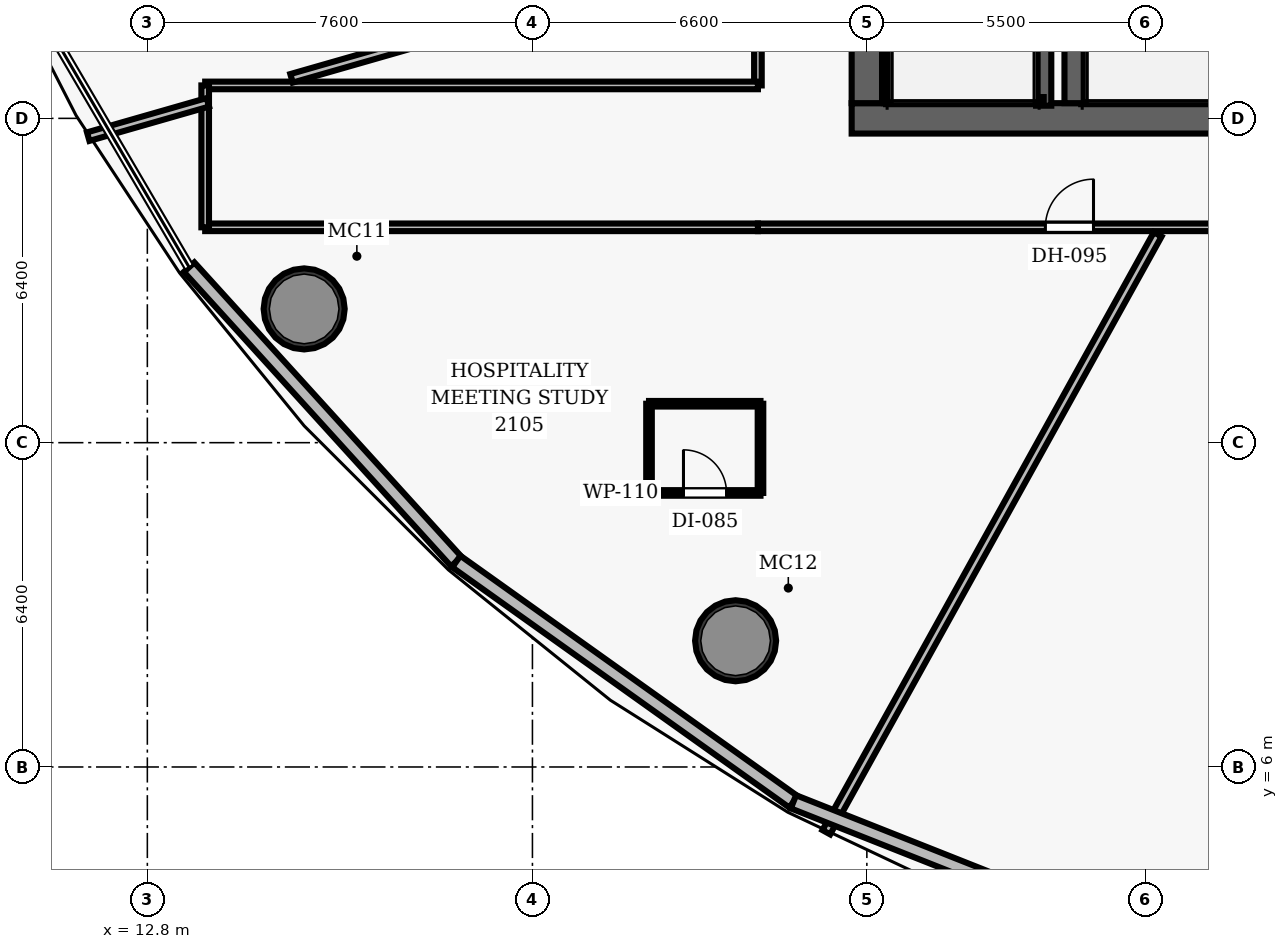
"""IFC4 building model, lengths in metres.
Left out: names, types, materials, properties, quantities, classifications, styles, units other than length and angle.
Written with IfcOpenShell. Run it as: python <this file> out.ifc"""

import sys

from ifc_helpers import new_model, si_unit, direction, frame, frame_2d, origin, origin_2d, place, context, subcontext, project, spatial, rectangle, hollow_circle, extrude, element, fill, save


model = new_model("IFC4")
c1 = context("Model", 3, precision=1e-05, world=origin(), true_north=direction((0.0, 1.0)))
c2 = subcontext(c1, "Body", "Model", "MODEL_VIEW")
j1 = project(units=[si_unit("LENGTHUNIT", "METRE"), si_unit("PLANEANGLEUNIT", "RADIAN")], contexts=[c1])
p1 = place(None, origin())
s1 = spatial("IfcSite", under=j1, at=p1, CompositionType="ELEMENT")
p2 = place(p1, origin())
s2 = spatial("IfcBuilding", under=s1, at=p2, CompositionType="ELEMENT")
p3 = place(p2, frame((0.0, 0.0, 90.4)))
s3 = spatial("IfcBuildingStorey", under=s2, at=p3, CompositionType="ELEMENT", Elevation=90.4)
p4 = place(p3, frame((26.7, 18.8, 0.0), z_axis=(0.0, 0.0, 1.0), x_axis=(1.0, 0.0, 0.0)))
e1 = element("IfcWall", 1, at=p4, inside=s3, PredefinedType="SHEAR", context=c2, shape_type="SweptSolid", body=[
    extrude(rectangle(XDim=22.6, YDim=0.6, at=frame_2d((11.3, 0.0))), origin(), (0.0, 0.0, 1.0), 3.5),
])
p5 = place(p4, frame((14.52, 0.0, 0.0)))
e2 = element("IfcOpeningElement", 2, at=p5, cuts=e1, PredefinedType="OPENING", context=c2, shape_type="SweptSolid", body=[
    extrude(rectangle(XDim=1.05, YDim=2.15, at=frame_2d((0.525, 1.075))), frame((0.0, 0.31, 0.0), z_axis=(0.0, -1.0, 0.0), x_axis=(1.0, 0.0, 0.0)), (0.0, 0.0, 1.0), 0.62),
])
p6 = place(p3, frame((27.0, 19.1, 0.0), z_axis=(0.0, 0.0, 1.0), x_axis=(0.0, 1.0, 0.0)))
e3 = element("IfcWall", 3, at=p6, inside=s3, PredefinedType="SHEAR", context=c2, shape_type="SweptSolid", body=[
    extrude(rectangle(XDim=13.8, YDim=0.6, at=frame_2d((6.9, 0.0))), origin(), (0.0, 0.0, 1.0), 3.5),
])
p7 = place(p6, frame((8.2, 0.0, 0.0)))
e4 = element("IfcOpeningElement", 4, at=p7, cuts=e3, PredefinedType="OPENING", context=c2, shape_type="SweptSolid", body=[
    extrude(rectangle(XDim=1.05, YDim=2.15, at=frame_2d((0.525, 1.075))), frame((0.0, 0.31, 0.0), z_axis=(0.0, -1.0, 0.0), x_axis=(1.0, 0.0, 0.0)), (0.0, 0.0, 1.0), 0.62),
])
p8 = place(p3, frame((31.1, 19.1, 0.0), z_axis=(0.0, 0.0, 1.0), x_axis=(0.0, 1.0, 0.0)))
e5 = element("IfcWall", 5, at=p8, inside=s3, PredefinedType="SHEAR", context=c2, shape_type="SweptSolid", body=[
    extrude(rectangle(XDim=13.8, YDim=0.4, at=frame_2d((6.9, 0.0))), origin(), (0.0, 0.0, 1.0), 3.5),
])
for number, where, z_axis, x_axis in (
    (6, (15.895, 15.04, 0.0), (0.0, 0.0, 1.0), (1.0, 0.0, 0.0)),
    (7, (24.41, 8.491, 0.0), (0.0, 0.0, 1.0), (1.0, 0.0, 0.0)),
):
    element("IfcColumn", number, at=place(p3, frame(where, z_axis=z_axis, x_axis=x_axis)), inside=s3, PredefinedType="COLUMN", context=c2, shape_type="SweptSolid", body=[
        extrude(hollow_circle(Radius=0.8, WallThickness=0.06, at=origin_2d()), origin(), (0.0, 0.0, 1.0), 3.5),
    ])
p9 = place(p3, frame((30.49, 19.05, 0.0), z_axis=(0.0, 0.0, 1.0), x_axis=(0.0, 1.0, 0.0)))
e8 = element("IfcWall", 8, at=p9, inside=s3, PredefinedType="SHEAR", context=c2, shape_type="SweptSolid", body=[
    extrude(rectangle(XDim=7.5, YDim=0.3, at=frame_2d((3.75, 0.0))), origin(), (0.0, 0.0, 1.0), 3.5),
])
p10 = place(p3, frame((27.395, 19.1, 0.0), z_axis=(0.0, 0.0, 1.0), x_axis=(0.0, 1.0, 0.0)))
e9 = element("IfcWall", 9, at=p10, inside=s3, PredefinedType="SHEAR", context=c2, shape_type="SweptSolid", body=[
    extrude(rectangle(XDim=7.45, YDim=0.12, at=frame_2d((3.725, 0.0))), origin(), (0.0, 0.0, 1.0), 3.5),
])
p11 = place(p3, frame((27.395, 19.16, 0.0), z_axis=(0.0, 0.0, 1.0), x_axis=(1.0, 0.0, 0.0)))
e10 = element("IfcWall", 10, at=p11, inside=s3, PredefinedType="SHEAR", context=c2, shape_type="SweptSolid", body=[
    extrude(rectangle(XDim=3.095, YDim=0.12, at=frame_2d((1.547, 0.0))), origin(), (0.0, 0.0, 1.0), 3.5),
])
p12 = place(p3, frame((31.3, 19.16, 0.0), z_axis=(0.0, 0.0, 1.0), x_axis=(1.0, 0.0, 0.0)))
e11 = element("IfcWall", 11, at=p12, inside=s3, PredefinedType="SHEAR", context=c2, shape_type="SweptSolid", body=[
    extrude(rectangle(XDim=3.04, YDim=0.12, at=frame_2d((1.52, 0.0))), origin(), (0.0, 0.0, 1.0), 3.5),
])
p13 = place(p3, frame((24.85, 16.65, 0.0), z_axis=(0.0, 0.0, 1.0), x_axis=(1.0, 0.0, 0.0)))
e12 = element("IfcWall", 12, at=p13, inside=s3, PredefinedType="PARTITIONING", context=c2, shape_type="SweptSolid", body=[
    extrude(rectangle(XDim=23.5, YDim=0.15, at=frame_2d((11.75, 0.0))), origin(), (0.0, 0.0, 1.0), 2.6),
])
p14 = place(p13, frame((5.673, 0.0, 0.0)))
e13 = element("IfcOpeningElement", 13, at=p14, cuts=e12, PredefinedType="OPENING", context=c2, shape_type="SweptSolid", body=[
    extrude(rectangle(XDim=0.95, YDim=2.15, at=frame_2d((0.475, 1.075))), frame((0.0, 0.085, 0.0), z_axis=(0.0, -1.0, 0.0), x_axis=(1.0, 0.0, 0.0)), (0.0, 0.0, 1.0), 0.17),
])
p15 = place(p13, frame((13.547, 0.0, 0.0)))
e14 = element("IfcOpeningElement", 14, at=p15, cuts=e12, PredefinedType="OPENING", context=c2, shape_type="SweptSolid", body=[
    extrude(rectangle(XDim=0.95, YDim=2.15, at=frame_2d((0.475, 1.075))), frame((0.0, 0.085, 0.0), z_axis=(0.0, -1.0, 0.0), x_axis=(1.0, 0.0, 0.0)), (0.0, 0.0, 1.0), 0.17),
])
p16 = place(p13, frame((17.077, 0.0, 0.0)))
e15 = element("IfcOpeningElement", 15, at=p16, cuts=e12, PredefinedType="OPENING", context=c2, shape_type="SweptSolid", body=[
    extrude(rectangle(XDim=0.95, YDim=2.15, at=frame_2d((0.475, 1.075))), frame((0.0, 0.085, 0.0), z_axis=(0.0, -1.0, 0.0), x_axis=(1.0, 0.0, 0.0)), (0.0, 0.0, 1.0), 0.17),
])
p17 = place(p3, frame((24.85, 19.45, 0.0), z_axis=(0.0, 0.0, 1.0), x_axis=(0.0, 1.0, 0.0)))
e16 = element("IfcWall", 16, at=p17, inside=s3, PredefinedType="PARTITIONING", context=c2, shape_type="SweptSolid", body=[
    extrude(rectangle(XDim=15.9, YDim=0.15, at=frame_2d((7.95, 0.0))), origin(), (0.0, 0.0, 1.0), 2.6),
])
p18 = place(p17, frame((7.852, 0.0, 0.0)))
e17 = element("IfcOpeningElement", 17, at=p18, cuts=e16, PredefinedType="OPENING", context=c2, shape_type="SweptSolid", body=[
    extrude(rectangle(XDim=0.95, YDim=2.15, at=frame_2d((0.475, 1.075))), frame((0.0, 0.085, 0.0), z_axis=(0.0, -1.0, 0.0), x_axis=(1.0, 0.0, 0.0)), (0.0, 0.0, 1.0), 0.17),
])
for number, where, z_axis, x_axis in (
    (18, (13.942, 19.45, 0.0), (0.0, 0.0, 1.0), (1.0, 0.0, 0.0)),
    (19, (13.942, 16.65, 0.0), (0.0, 0.0, 1.0), (1.0, 0.0, 0.0)),
):
    element("IfcWall", number, at=place(p3, frame(where, z_axis=z_axis, x_axis=x_axis)), inside=s3, PredefinedType="PARTITIONING", context=c2, shape_type="SweptSolid", body=[
        extrude(rectangle(XDim=10.908, YDim=0.15, at=frame_2d((5.454, 0.0))), origin(), (0.0, 0.0, 1.0), 2.6),
    ])
p19 = place(p3, frame((13.942, 16.65, 0.0), z_axis=(0.0, 0.0, 1.0), x_axis=(0.0, 1.0, 0.0)))
e20 = element("IfcWall", 20, at=p19, inside=s3, PredefinedType="PARTITIONING", context=c2, shape_type="SweptSolid", body=[
    extrude(rectangle(XDim=2.8, YDim=0.15, at=frame_2d((1.4, 0.0))), origin(), (0.0, 0.0, 1.0), 2.6),
])
p20 = place(p3, frame((24.71, 22.189, 0.0), z_axis=(0.0, 0.0, 1.0), x_axis=(-0.961261668066, -0.275637453019, 0.0)))
e21 = element("IfcWall", 21, at=p20, inside=s3, PredefinedType="PARTITIONING", context=c2, shape_type="SweptSolid", body=[
    extrude(rectangle(XDim=9.429, YDim=0.175, at=frame_2d((4.715, 0.0))), origin(), (0.0, 0.0, 1.0), 2.6),
])
p21 = place(p3, frame((13.994, 19.116, 0.0), z_axis=(0.0, 0.0, 1.0), x_axis=(-0.961257162415, -0.275653165602, 0.0)))
e22 = element("IfcWall", 22, at=p21, inside=s3, PredefinedType="PARTITIONING", context=c2, shape_type="SweptSolid", body=[
    extrude(rectangle(XDim=2.456, YDim=0.175, at=frame_2d((1.228, 0.0))), origin(), (0.0, 0.0, 1.0), 2.6),
])
p22 = place(p3, frame((32.74, 16.51, 0.0), z_axis=(0.0, 0.0, 1.0), x_axis=(-0.484803658496, -0.874623011765, 0.0)))
e23 = element("IfcWall", 23, at=p22, inside=s3, PredefinedType="PARTITIONING", context=c2, shape_type="SweptSolid", body=[
    extrude(rectangle(XDim=13.489, YDim=0.175, at=frame_2d((6.745, 0.0))), origin(), (0.0, 0.0, 1.0), 2.6),
])
p23 = place(p3, frame((22.701, 11.408, 0.0), z_axis=(0.0, 0.0, 1.0), x_axis=(1.0, 0.0, 0.0)))
e24 = element("IfcWall", 24, at=p23, inside=s3, PredefinedType="PARTITIONING", context=c2, shape_type="SweptSolid", body=[
    extrude(rectangle(XDim=2.2, YDim=0.11, at=frame_2d((1.1, 0.0))), origin(), (0.0, 0.0, 1.0), 2.6),
])
p24 = place(p23, frame((0.68, 0.0, 0.0)))
e25 = element("IfcOpeningElement", 25, at=p24, cuts=e24, PredefinedType="OPENING", context=c2, shape_type="SweptSolid", body=[
    extrude(rectangle(XDim=0.85, YDim=2.1, at=frame_2d((0.425, 1.05))), frame((0.0, 0.065, 0.0), z_axis=(0.0, -1.0, 0.0), x_axis=(1.0, 0.0, 0.0)), (0.0, 0.0, 1.0), 0.13),
])
p25 = place(p3, frame((22.701, 13.168, 0.0), z_axis=(0.0, 0.0, 1.0), x_axis=(1.0, 0.0, 0.0)))
e26 = element("IfcWall", 26, at=p25, inside=s3, PredefinedType="PARTITIONING", context=c2, shape_type="SweptSolid", body=[
    extrude(rectangle(XDim=2.2, YDim=0.11, at=frame_2d((1.1, 0.0))), origin(), (0.0, 0.0, 1.0), 2.6),
])
for number, where, z_axis, x_axis in (
    (27, (22.701, 11.408, 0.0), (0.0, 0.0, 1.0), (0.0, 1.0, 0.0)),
    (28, (24.901, 11.408, 0.0), (0.0, 0.0, 1.0), (0.0, 1.0, 0.0)),
):
    element("IfcWall", number, at=place(p3, frame(where, z_axis=z_axis, x_axis=x_axis)), inside=s3, PredefinedType="PARTITIONING", context=c2, shape_type="SweptSolid", body=[
        extrude(rectangle(XDim=1.76, YDim=0.11, at=frame_2d((0.88, 0.0))), origin(), (0.0, 0.0, 1.0), 2.6),
    ])
p26 = place(p3, frame((18.897, 10.055, 0.0), z_axis=(0.0, 0.0, 1.0), x_axis=(-0.672142867196, 0.740421478671, 0.0)))
e29 = element("IfcWall", 29, at=p26, inside=s3, PredefinedType="SOLIDWALL", context=c2, shape_type="SweptSolid", body=[
    extrude(rectangle(XDim=7.845, YDim=0.28, at=frame_2d((3.922, 0.0))), origin(), (0.0, 0.0, 1.0), 3.25),
])
p27 = place(p3, frame((25.551, 5.313, 0.0), z_axis=(0.0, 0.0, 1.0), x_axis=(-0.814366918051, 0.580350344865, 0.0)))
e30 = element("IfcWall", 30, at=p27, inside=s3, PredefinedType="SOLIDWALL", context=c2, shape_type="SweptSolid", body=[
    extrude(rectangle(XDim=8.171, YDim=0.28, at=frame_2d((4.085, 0.0))), origin(), (0.0, 0.0, 1.0), 3.25),
])
p28 = place(p3, frame((33.213, 2.278, 0.0), z_axis=(0.0, 0.0, 1.0), x_axis=(-0.929723797597, 0.368257600304, 0.0)))
e31 = element("IfcWall", 31, at=p28, inside=s3, PredefinedType="SOLIDWALL", context=c2, shape_type="SweptSolid", body=[
    extrude(rectangle(XDim=8.241, YDim=0.28, at=frame_2d((4.121, 0.0))), origin(), (0.0, 0.0, 1.0), 3.25),
])
p29 = place(p14, origin())
e32 = element("IfcDoor", 32, at=p29, inside=s3, OperationType="SINGLE_SWING_RIGHT", PredefinedType="DOOR", context=c2, shape_type="SweptSolid", body=[
    extrude(rectangle(XDim=0.95, YDim=2.15, at=frame_2d((0.475, 1.075))), frame((0.0, 0.025, 0.0), z_axis=(0.0, -1.0, 0.0), x_axis=(1.0, 0.0, 0.0)), (0.0, 0.0, 1.0), 0.05),
])
fill(e13, e32)
p30 = place(p24, origin())
e33 = element("IfcDoor", 33, at=p30, inside=s3, OperationType="SINGLE_SWING_LEFT", PredefinedType="DOOR", context=c2, shape_type="SweptSolid", body=[
    extrude(rectangle(XDim=0.85, YDim=2.1, at=frame_2d((0.425, 1.05))), frame((0.0, 0.025, 0.0), z_axis=(0.0, -1.0, 0.0), x_axis=(1.0, 0.0, 0.0)), (0.0, 0.0, 1.0), 0.05),
])
fill(e25, e33)
save(model, sys.argv[1])
